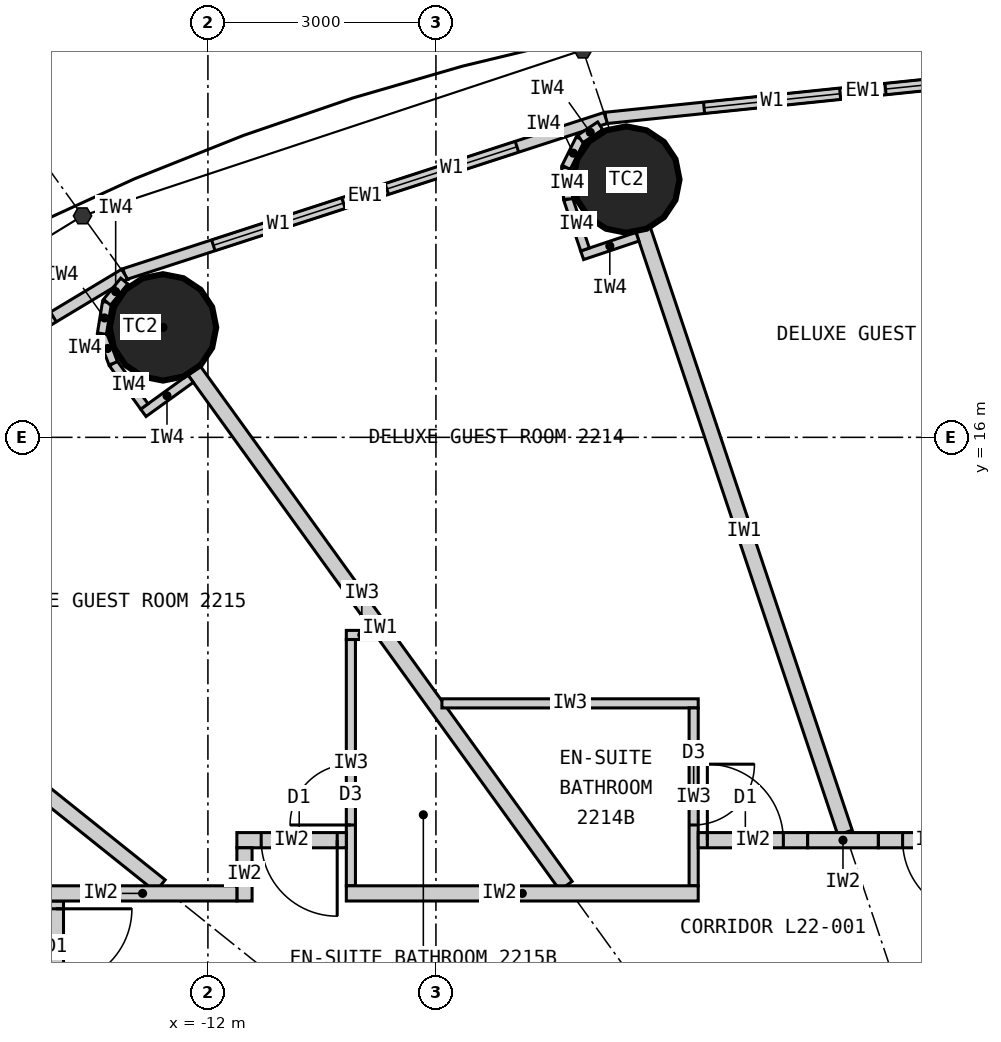
"""IFC4 building model, lengths in metres.
Left out: names, types, materials, properties, quantities, classifications, styles, units other than length and angle.
Written with IfcOpenShell. Run it as: python <this file> out.ifc"""

import sys

from ifc_helpers import new_model, si_unit, direction, frame, frame_2d, origin, origin_2d, place, context, subcontext, project, spatial, rectangle, circle, extrude, element, fill, save


model = new_model("IFC4")
c1 = context("Model", 3, precision=1e-05, world=origin(), true_north=direction((0.0, 1.0)))
c2 = subcontext(c1, "Body", "Model", "MODEL_VIEW")
j1 = project(units=[si_unit("LENGTHUNIT", "METRE"), si_unit("PLANEANGLEUNIT", "RADIAN")], contexts=[c1])
p1 = place(None, origin())
s1 = spatial("IfcSite", under=j1, at=p1, CompositionType="ELEMENT")
p2 = place(p1, origin())
s2 = spatial("IfcBuilding", under=s1, at=p2, CompositionType="ELEMENT")
p3 = place(p2, frame((0.0, 0.0, 87.0)))
s3 = spatial("IfcBuildingStorey", under=s2, at=p3, CompositionType="ELEMENT", Elevation=87.0)
for number, where, z_axis, x_axis in (
    (1, (-6.495, 19.391, 0.0), (0.0, 0.0, 1.0), (1.0, 0.0, 0.0)),
    (2, (-12.591, 17.447, 0.0), (0.0, 0.0, 1.0), (1.0, 0.0, 0.0)),
):
    element("IfcColumn", number, at=place(p3, frame(where, z_axis=z_axis, x_axis=x_axis)), inside=s3, PredefinedType="COLUMN", context=c2, shape_type="SweptSolid", body=[
        extrude(circle(Radius=0.7, at=origin_2d()), origin(), (0.0, 0.0, 1.0), 3.3),
    ])
p4 = place(p3, frame((0.0, 20.9, 0.0), z_axis=(0.0, 0.0, 1.0), x_axis=(-0.994721394369, -0.102612609291, 0.0)))
e3 = element("IfcWall", 3, at=p4, inside=s3, PredefinedType="ELEMENTEDWALL", context=c2, shape_type="SweptSolid", body=[
    extrude(rectangle(XDim=6.802, YDim=0.15, at=frame_2d((3.401, 0.0))), origin(), (0.0, 0.0, 1.0), 3.12),
])
p5 = place(p4, frame((1.301, 0.0, 0.9)))
e4 = element("IfcOpeningElement", 4, at=p5, cuts=e3, PredefinedType="OPENING", context=c2, shape_type="SweptSolid", body=[
    extrude(rectangle(XDim=1.8, YDim=1.9, at=frame_2d((0.9, 0.95))), frame((0.0, 0.085, 0.0), z_axis=(0.0, -1.0, 0.0), x_axis=(1.0, 0.0, 0.0)), (0.0, 0.0, 1.0), 0.17),
])
p6 = place(p4, frame((3.701, 0.0, 0.9)))
e5 = element("IfcOpeningElement", 5, at=p6, cuts=e3, PredefinedType="OPENING", context=c2, shape_type="SweptSolid", body=[
    extrude(rectangle(XDim=1.8, YDim=1.9, at=frame_2d((0.9, 0.95))), frame((0.0, 0.085, 0.0), z_axis=(0.0, -1.0, 0.0), x_axis=(1.0, 0.0, 0.0)), (0.0, 0.0, 1.0), 0.17),
])
p7 = place(p3, frame((-6.766, 20.202, 0.0), z_axis=(0.0, 0.0, 1.0), x_axis=(-0.951137534625, -0.308767534285, 0.0)))
e6 = element("IfcWall", 6, at=p7, inside=s3, PredefinedType="ELEMENTEDWALL", context=c2, shape_type="SweptSolid", body=[
    extrude(rectangle(XDim=6.655, YDim=0.15, at=frame_2d((3.328, 0.0))), origin(), (0.0, 0.0, 1.0), 3.12),
])
p8 = place(p7, frame((1.228, 0.0, 0.9)))
e7 = element("IfcOpeningElement", 7, at=p8, cuts=e6, PredefinedType="OPENING", context=c2, shape_type="SweptSolid", body=[
    extrude(rectangle(XDim=1.8, YDim=1.9, at=frame_2d((0.9, 0.95))), frame((0.0, 0.085, 0.0), z_axis=(0.0, -1.0, 0.0), x_axis=(1.0, 0.0, 0.0)), (0.0, 0.0, 1.0), 0.17),
])
p9 = place(p7, frame((3.628, 0.0, 0.9)))
e8 = element("IfcOpeningElement", 8, at=p9, cuts=e6, PredefinedType="OPENING", context=c2, shape_type="SweptSolid", body=[
    extrude(rectangle(XDim=1.8, YDim=1.9, at=frame_2d((0.9, 0.95))), frame((0.0, 0.085, 0.0), z_axis=(0.0, -1.0, 0.0), x_axis=(1.0, 0.0, 0.0)), (0.0, 0.0, 1.0), 0.17),
])
p10 = place(p3, frame((-13.096, 18.147, 0.0), z_axis=(0.0, 0.0, 1.0), x_axis=(-0.856983180864, -0.515344377787, 0.0)))
e9 = element("IfcWall", 9, at=p10, inside=s3, PredefinedType="ELEMENTEDWALL", context=c2, shape_type="SweptSolid", body=[
    extrude(rectangle(XDim=6.386, YDim=0.15, at=frame_2d((3.193, 0.0))), origin(), (0.0, 0.0, 1.0), 3.12),
])
p11 = place(p10, frame((1.093, 0.0, 0.9)))
e10 = element("IfcOpeningElement", 10, at=p11, cuts=e9, PredefinedType="OPENING", context=c2, shape_type="SweptSolid", body=[
    extrude(rectangle(XDim=1.8, YDim=1.9, at=frame_2d((0.9, 0.95))), frame((0.0, 0.085, 0.0), z_axis=(0.0, -1.0, 0.0), x_axis=(1.0, 0.0, 0.0)), (0.0, 0.0, 1.0), 0.17),
])
p12 = place(p10, frame((3.493, 0.0, 0.9)))
e11 = element("IfcOpeningElement", 11, at=p12, cuts=e9, PredefinedType="OPENING", context=c2, shape_type="SweptSolid", body=[
    extrude(rectangle(XDim=1.8, YDim=1.9, at=frame_2d((0.9, 0.95))), frame((0.0, 0.085, 0.0), z_axis=(0.0, -1.0, 0.0), x_axis=(1.0, 0.0, 0.0)), (0.0, 0.0, 1.0), 0.17),
])
p13 = place(p3, frame((-3.617, 10.8, 0.0), z_axis=(0.0, 0.0, 1.0), x_axis=(-0.317576599239, 0.948232621046, 0.0)))
e12 = element("IfcWall", 12, at=p13, inside=s3, PredefinedType="PARTITIONING", context=c2, shape_type="SweptSolid", body=[
    extrude(rectangle(XDim=8.36, YDim=0.2, at=frame_2d((4.18, 0.0))), origin(), (0.0, 0.0, 1.0), 2.27),
])
p14 = place(p3, frame((-7.289, 10.1, 0.0), z_axis=(0.0, 0.0, 1.0), x_axis=(-0.585198353053, 0.810890182197, 0.0)))
e13 = element("IfcWall", 13, at=p14, inside=s3, PredefinedType="PARTITIONING", context=c2, shape_type="SweptSolid", body=[
    extrude(rectangle(XDim=8.36, YDim=0.2, at=frame_2d((4.18, 0.0))), origin(), (0.0, 0.0, 1.0), 2.27),
])
p15 = place(p3, frame((-12.625, 10.1, 0.0), z_axis=(0.0, 0.0, 1.0), x_axis=(-0.780892451574, 0.624665493744, 0.0)))
e14 = element("IfcWall", 14, at=p15, inside=s3, PredefinedType="PARTITIONING", context=c2, shape_type="SweptSolid", body=[
    extrude(rectangle(XDim=6.045, YDim=0.2, at=frame_2d((3.022, 0.0))), origin(), (0.0, 0.0, 1.0), 2.27),
])
p16 = place(p3, frame((-8.921, 12.5, 0.0), z_axis=(0.0, 0.0, 1.0), x_axis=(1.0, 0.0, 0.0)))
e15 = element("IfcWall", 15, at=p16, inside=s3, PredefinedType="PARTITIONING", context=c2, shape_type="SweptSolid", body=[
    extrude(rectangle(XDim=3.372, YDim=0.12, at=frame_2d((1.686, 0.0))), origin(), (0.0, 0.0, 1.0), 3.12),
])
p17 = place(p3, frame((-5.609, 10.1, 0.0), z_axis=(0.0, 0.0, 1.0), x_axis=(0.0, 1.0, 0.0)))
e16 = element("IfcWall", 16, at=p17, inside=s3, PredefinedType="PARTITIONING", context=c2, shape_type="SweptSolid", body=[
    extrude(rectangle(XDim=2.34, YDim=0.12, at=frame_2d((1.17, 0.0))), origin(), (0.0, 0.0, 1.0), 3.12),
])
p18 = place(p17, frame((0.8, 0.0, 0.0)))
e17 = element("IfcOpeningElement", 17, at=p18, cuts=e16, PredefinedType="OPENING", context=c2, shape_type="SweptSolid", body=[
    extrude(rectangle(XDim=0.8, YDim=2.1, at=frame_2d((0.4, 1.05))), frame((0.0, 0.07, 0.0), z_axis=(0.0, -1.0, 0.0), x_axis=(1.0, 0.0, 0.0)), (0.0, 0.0, 1.0), 0.14),
])
p19 = place(p3, frame((-9.771, 13.4, 0.0), z_axis=(0.0, 0.0, 1.0), x_axis=(-1.0, 0.0, 0.0)))
e18 = element("IfcWall", 18, at=p19, inside=s3, PredefinedType="PARTITIONING", context=c2, shape_type="SweptSolid", body=[
    extrude(rectangle(XDim=0.408, YDim=0.12, at=frame_2d((0.204, 0.0))), origin(), (0.0, 0.0, 1.0), 3.12),
])
p20 = place(p3, frame((-10.119, 10.1, 0.0), z_axis=(0.0, 0.0, 1.0), x_axis=(0.0, 1.0, 0.0)))
e19 = element("IfcWall", 19, at=p20, inside=s3, PredefinedType="PARTITIONING", context=c2, shape_type="SweptSolid", body=[
    extrude(rectangle(XDim=3.24, YDim=0.12, at=frame_2d((1.62, 0.0))), origin(), (0.0, 0.0, 1.0), 3.12),
])
p21 = place(p20, frame((0.8, 0.0, 0.0)))
e20 = element("IfcOpeningElement", 20, at=p21, cuts=e19, PredefinedType="OPENING", context=c2, shape_type="SweptSolid", body=[
    extrude(rectangle(XDim=0.8, YDim=2.1, at=frame_2d((0.4, 1.05))), frame((0.0, 0.07, 0.0), z_axis=(0.0, -1.0, 0.0), x_axis=(1.0, 0.0, 0.0)), (0.0, 0.0, 1.0), 0.14),
])
p22 = place(p3, frame((-3.18, 10.7, 0.0), z_axis=(0.0, 0.0, 1.0), x_axis=(1.0, 0.0, 0.0)))
e21 = element("IfcWall", 21, at=p22, inside=s3, PredefinedType="PARTITIONING", context=c2, shape_type="SweptSolid", body=[
    extrude(rectangle(XDim=1.44, YDim=0.2, at=frame_2d((0.72, 0.0))), origin(), (0.0, 0.0, 1.0), 3.12),
])
p23 = place(p22, frame((0.32, 0.0, 0.0)))
e22 = element("IfcOpeningElement", 22, at=p23, cuts=e21, PredefinedType="OPENING", context=c2, shape_type="SweptSolid", body=[
    extrude(rectangle(XDim=1.0, YDim=2.2, at=frame_2d((0.5, 1.1))), frame((0.0, 0.11, 0.0), z_axis=(0.0, -1.0, 0.0), x_axis=(1.0, 0.0, 0.0)), (0.0, 0.0, 1.0), 0.22),
])
p24 = place(p3, frame((-5.549, 10.7, 0.0), z_axis=(0.0, 0.0, 1.0), x_axis=(1.0, 0.0, 0.0)))
e23 = element("IfcWall", 23, at=p24, inside=s3, PredefinedType="PARTITIONING", context=c2, shape_type="SweptSolid", body=[
    extrude(rectangle(XDim=1.44, YDim=0.2, at=frame_2d((0.72, 0.0))), origin(), (0.0, 0.0, 1.0), 3.12),
])
p25 = place(p24, frame((0.12, 0.0, 0.0)))
e24 = element("IfcOpeningElement", 24, at=p25, cuts=e23, PredefinedType="OPENING", context=c2, shape_type="SweptSolid", body=[
    extrude(rectangle(XDim=1.0, YDim=2.2, at=frame_2d((0.5, 1.1))), frame((0.0, 0.11, 0.0), z_axis=(0.0, -1.0, 0.0), x_axis=(1.0, 0.0, 0.0)), (0.0, 0.0, 1.0), 0.22),
])
p26 = place(p3, frame((-11.619, 10.7, 0.0), z_axis=(0.0, 0.0, 1.0), x_axis=(1.0, 0.0, 0.0)))
e25 = element("IfcWall", 25, at=p26, inside=s3, PredefinedType="PARTITIONING", context=c2, shape_type="SweptSolid", body=[
    extrude(rectangle(XDim=1.44, YDim=0.2, at=frame_2d((0.72, 0.0))), origin(), (0.0, 0.0, 1.0), 3.12),
])
p27 = place(p26, frame((0.32, 0.0, 0.0)))
e26 = element("IfcOpeningElement", 26, at=p27, cuts=e25, PredefinedType="OPENING", context=c2, shape_type="SweptSolid", body=[
    extrude(rectangle(XDim=1.0, YDim=2.2, at=frame_2d((0.5, 1.1))), frame((0.0, 0.11, 0.0), z_axis=(0.0, -1.0, 0.0), x_axis=(1.0, 0.0, 0.0)), (0.0, 0.0, 1.0), 0.22),
])
p28 = place(p3, frame((-11.519, 9.9, 0.0), z_axis=(0.0, 0.0, 1.0), x_axis=(0.0, 1.0, 0.0)))
e27 = element("IfcWall", 27, at=p28, inside=s3, PredefinedType="PARTITIONING", context=c2, shape_type="SweptSolid", body=[
    extrude(rectangle(XDim=0.7, YDim=0.2, at=frame_2d((0.35, 0.0))), origin(), (0.0, 0.0, 1.0), 3.12),
])
p29 = place(p3, frame((-4.109, 10.7, 0.0), z_axis=(0.0, 0.0, 1.0), x_axis=(1.0, 0.0, 0.0)))
e28 = element("IfcWall", 28, at=p29, inside=s3, PredefinedType="PARTITIONING", context=c2, shape_type="SweptSolid", body=[
    extrude(rectangle(XDim=0.929, YDim=0.2, at=frame_2d((0.465, 0.0))), origin(), (0.0, 0.0, 1.0), 3.12),
])
p30 = place(p3, frame((-14.0, 9.9, 0.0), z_axis=(0.0, 0.0, 1.0), x_axis=(0.0, -1.0, 0.0)))
e29 = element("IfcWall", 29, at=p30, inside=s3, PredefinedType="PARTITIONING", context=c2, shape_type="SweptSolid", body=[
    extrude(rectangle(XDim=5.127, YDim=0.2, at=frame_2d((2.564, 0.0))), origin(), (0.0, 0.0, 1.0), 3.12),
])
p31 = place(p30, frame((0.103, 0.0, 0.0)))
e30 = element("IfcOpeningElement", 30, at=p31, cuts=e29, PredefinedType="OPENING", context=c2, shape_type="SweptSolid", body=[
    extrude(rectangle(XDim=1.0, YDim=2.2, at=frame_2d((0.5, 1.1))), frame((0.0, 0.11, 0.0), z_axis=(0.0, -1.0, 0.0), x_axis=(1.0, 0.0, 0.0)), (0.0, 0.0, 1.0), 0.22),
])
p32 = place(p3, frame((-14.1, 10.0, 0.0), z_axis=(0.0, 0.0, 1.0), x_axis=(1.0, 0.0, 0.0)))
e31 = element("IfcWall", 31, at=p32, inside=s3, PredefinedType="PARTITIONING", context=c2, shape_type="SweptSolid", body=[
    extrude(rectangle(XDim=2.481, YDim=0.2, at=frame_2d((1.24, 0.0))), origin(), (0.0, 0.0, 1.0), 3.12),
])
p33 = place(p3, frame((-10.179, 10.0, 0.0), z_axis=(0.0, 0.0, 1.0), x_axis=(1.0, 0.0, 0.0)))
e32 = element("IfcWall", 32, at=p33, inside=s3, PredefinedType="PARTITIONING", context=c2, shape_type="SweptSolid", body=[
    extrude(rectangle(XDim=4.63, YDim=0.2, at=frame_2d((2.315, 0.0))), origin(), (0.0, 0.0, 1.0), 3.12),
])
p34 = place(p3, frame((-6.348, 18.639, 0.0), z_axis=(0.0, 0.0, 1.0), x_axis=(-0.948268951266, -0.317468102437, 0.0)))
e33 = element("IfcWall", 33, at=p34, inside=s3, PredefinedType="PARTITIONING", context=c2, shape_type="SweptSolid", body=[
    extrude(rectangle(XDim=0.768, YDim=0.12, at=frame_2d((0.384, 0.0))), origin(), (0.0, 0.0, 1.0), 3.12),
])
p35 = place(p3, frame((-7.038, 18.471, 0.0), z_axis=(0.0, 0.0, 1.0), x_axis=(-0.317378466199, 0.9482989556, 0.0)))
e34 = element("IfcWall", 34, at=p35, inside=s3, PredefinedType="PARTITIONING", context=c2, shape_type="SweptSolid", body=[
    extrude(rectangle(XDim=0.7, YDim=0.12, at=frame_2d((0.35, 0.0))), origin(), (0.0, 0.0, 1.0), 3.12),
])
p36 = place(p3, frame((-7.26, 19.135, 0.0), z_axis=(0.0, 0.0, 1.0), x_axis=(-0.0613238046, 0.99811792439, 0.0)))
e35 = element("IfcWall", 35, at=p36, inside=s3, PredefinedType="PARTITIONING", context=c2, shape_type="SweptSolid", body=[
    extrude(rectangle(XDim=0.418, YDim=0.12, at=frame_2d((0.209, 0.0))), origin(), (0.0, 0.0, 1.0), 3.12),
])
p37 = place(p3, frame((-7.286, 19.552, 0.0), z_axis=(0.0, 0.0, 1.0), x_axis=(0.445810757773, 0.89512723579, 0.0)))
e36 = element("IfcWall", 36, at=p37, inside=s3, PredefinedType="PARTITIONING", context=c2, shape_type="SweptSolid", body=[
    extrude(rectangle(XDim=0.418, YDim=0.12, at=frame_2d((0.209, 0.0))), origin(), (0.0, 0.0, 1.0), 3.12),
])
p38 = place(p3, frame((-7.1, 19.926, 0.0), z_axis=(0.0, 0.0, 1.0), x_axis=(0.833488262509, 0.552537162787, 0.0)))
e37 = element("IfcWall", 37, at=p38, inside=s3, PredefinedType="PARTITIONING", context=c2, shape_type="SweptSolid", body=[
    extrude(rectangle(XDim=0.313, YDim=0.12, at=frame_2d((0.156, 0.0))), origin(), (0.0, 0.0, 1.0), 3.12),
])
p39 = place(p3, frame((-12.227, 16.772, 0.0), z_axis=(0.0, 0.0, 1.0), x_axis=(-0.810821798253, -0.585293098778, 0.0)))
e38 = element("IfcWall", 38, at=p39, inside=s3, PredefinedType="PARTITIONING", context=c2, shape_type="SweptSolid", body=[
    extrude(rectangle(XDim=0.768, YDim=0.12, at=frame_2d((0.384, 0.0))), origin(), (0.0, 0.0, 1.0), 3.12),
])
p40 = place(p3, frame((-12.836, 16.406, 0.0), z_axis=(0.0, 0.0, 1.0), x_axis=(-0.585223113993, 0.810872312296, 0.0)))
e39 = element("IfcWall", 39, at=p40, inside=s3, PredefinedType="PARTITIONING", context=c2, shape_type="SweptSolid", body=[
    extrude(rectangle(XDim=0.7, YDim=0.12, at=frame_2d((0.35, 0.0))), origin(), (0.0, 0.0, 1.0), 3.12),
])
p41 = place(p3, frame((-13.246, 16.974, 0.0), z_axis=(0.0, 0.0, 1.0), x_axis=(-0.355728122235, 0.934589483705, 0.0)))
e40 = element("IfcWall", 40, at=p41, inside=s3, PredefinedType="PARTITIONING", context=c2, shape_type="SweptSolid", body=[
    extrude(rectangle(XDim=0.418, YDim=0.12, at=frame_2d((0.209, 0.0))), origin(), (0.0, 0.0, 1.0), 3.12),
])
p42 = place(p3, frame((-13.394, 17.365, 0.0), z_axis=(0.0, 0.0, 1.0), x_axis=(0.159379276926, 0.987217425943, 0.0)))
e41 = element("IfcWall", 41, at=p42, inside=s3, PredefinedType="PARTITIONING", context=c2, shape_type="SweptSolid", body=[
    extrude(rectangle(XDim=0.418, YDim=0.12, at=frame_2d((0.209, 0.0))), origin(), (0.0, 0.0, 1.0), 3.12),
])
p43 = place(p3, frame((-13.328, 17.777, 0.0), z_axis=(0.0, 0.0, 1.0), x_axis=(0.632276783541, 0.774742582407, 0.0)))
e42 = element("IfcWall", 42, at=p43, inside=s3, PredefinedType="PARTITIONING", context=c2, shape_type="SweptSolid", body=[
    extrude(rectangle(XDim=0.36, YDim=0.12, at=frame_2d((0.18, 0.0))), origin(), (0.0, 0.0, 1.0), 3.12),
])
p44 = place(p5, origin())
e43 = element("IfcWindow", 43, at=p44, inside=s3, PartitioningType="SINGLE_PANEL", PredefinedType="WINDOW", context=c2, shape_type="SweptSolid", body=[
    extrude(rectangle(XDim=1.8, YDim=1.9, at=frame_2d((0.9, 0.95))), frame((0.0, 0.03, 0.0), z_axis=(0.0, -1.0, 0.0), x_axis=(1.0, 0.0, 0.0)), (0.0, 0.0, 1.0), 0.06),
])
fill(e4, e43)
p45 = place(p6, origin())
e44 = element("IfcWindow", 44, at=p45, inside=s3, PartitioningType="SINGLE_PANEL", PredefinedType="WINDOW", context=c2, shape_type="SweptSolid", body=[
    extrude(rectangle(XDim=1.8, YDim=1.9, at=frame_2d((0.9, 0.95))), frame((0.0, 0.03, 0.0), z_axis=(0.0, -1.0, 0.0), x_axis=(1.0, 0.0, 0.0)), (0.0, 0.0, 1.0), 0.06),
])
fill(e5, e44)
p46 = place(p8, origin())
e45 = element("IfcWindow", 45, at=p46, inside=s3, PartitioningType="SINGLE_PANEL", PredefinedType="WINDOW", context=c2, shape_type="SweptSolid", body=[
    extrude(rectangle(XDim=1.8, YDim=1.9, at=frame_2d((0.9, 0.95))), frame((0.0, 0.03, 0.0), z_axis=(0.0, -1.0, 0.0), x_axis=(1.0, 0.0, 0.0)), (0.0, 0.0, 1.0), 0.06),
])
fill(e7, e45)
p47 = place(p9, origin())
e46 = element("IfcWindow", 46, at=p47, inside=s3, PartitioningType="SINGLE_PANEL", PredefinedType="WINDOW", context=c2, shape_type="SweptSolid", body=[
    extrude(rectangle(XDim=1.8, YDim=1.9, at=frame_2d((0.9, 0.95))), frame((0.0, 0.03, 0.0), z_axis=(0.0, -1.0, 0.0), x_axis=(1.0, 0.0, 0.0)), (0.0, 0.0, 1.0), 0.06),
])
fill(e8, e46)
p48 = place(p11, origin())
e47 = element("IfcWindow", 47, at=p48, inside=s3, PartitioningType="SINGLE_PANEL", PredefinedType="WINDOW", context=c2, shape_type="SweptSolid", body=[
    extrude(rectangle(XDim=1.8, YDim=1.9, at=frame_2d((0.9, 0.95))), frame((0.0, 0.03, 0.0), z_axis=(0.0, -1.0, 0.0), x_axis=(1.0, 0.0, 0.0)), (0.0, 0.0, 1.0), 0.06),
])
fill(e10, e47)
p49 = place(p23, origin())
e48 = element("IfcDoor", 48, at=p49, inside=s3, OperationType="SINGLE_SWING_RIGHT", PredefinedType="DOOR", context=c2, shape_type="SweptSolid", body=[
    extrude(rectangle(XDim=1.0, YDim=2.2, at=frame_2d((0.5, 1.1))), frame((0.0, 0.025, 0.0), z_axis=(0.0, -1.0, 0.0), x_axis=(1.0, 0.0, 0.0)), (0.0, 0.0, 1.0), 0.05),
])
fill(e22, e48)
p50 = place(p18, origin())
e49 = element("IfcDoor", 49, at=p50, inside=s3, OperationType="SINGLE_SWING_RIGHT", PredefinedType="DOOR", context=c2, shape_type="SweptSolid", body=[
    extrude(rectangle(XDim=0.8, YDim=2.1, at=frame_2d((0.4, 1.05))), frame((0.0, 0.025, 0.0), z_axis=(0.0, -1.0, 0.0), x_axis=(1.0, 0.0, 0.0)), (0.0, 0.0, 1.0), 0.05),
])
fill(e17, e49)
p51 = place(p25, origin())
e50 = element("IfcDoor", 50, at=p51, inside=s3, OperationType="SINGLE_SWING_LEFT", PredefinedType="DOOR", context=c2, shape_type="SweptSolid", body=[
    extrude(rectangle(XDim=1.0, YDim=2.2, at=frame_2d((0.5, 1.1))), frame((0.0, 0.025, 0.0), z_axis=(0.0, -1.0, 0.0), x_axis=(1.0, 0.0, 0.0)), (0.0, 0.0, 1.0), 0.05),
])
fill(e24, e50)
p52 = place(p21, origin())
e51 = element("IfcDoor", 51, at=p52, inside=s3, OperationType="SINGLE_SWING_LEFT", PredefinedType="DOOR", context=c2, shape_type="SweptSolid", body=[
    extrude(rectangle(XDim=0.8, YDim=2.1, at=frame_2d((0.4, 1.05))), frame((0.0, 0.025, 0.0), z_axis=(0.0, -1.0, 0.0), x_axis=(1.0, 0.0, 0.0)), (0.0, 0.0, 1.0), 0.05),
])
fill(e20, e51)
p53 = place(p27, origin())
e52 = element("IfcDoor", 52, at=p53, inside=s3, OperationType="SINGLE_SWING_RIGHT", PredefinedType="DOOR", context=c2, shape_type="SweptSolid", body=[
    extrude(rectangle(XDim=1.0, YDim=2.2, at=frame_2d((0.5, 1.1))), frame((0.0, 0.025, 0.0), z_axis=(0.0, -1.0, 0.0), x_axis=(1.0, 0.0, 0.0)), (0.0, 0.0, 1.0), 0.05),
])
fill(e26, e52)
p54 = place(p31, origin())
e53 = element("IfcDoor", 53, at=p54, inside=s3, OperationType="SINGLE_SWING_LEFT", PredefinedType="DOOR", context=c2, shape_type="SweptSolid", body=[
    extrude(rectangle(XDim=1.0, YDim=2.2, at=frame_2d((0.5, 1.1))), frame((0.0, 0.025, 0.0), z_axis=(0.0, -1.0, 0.0), x_axis=(1.0, 0.0, 0.0)), (0.0, 0.0, 1.0), 0.05),
])
fill(e30, e53)
save(model, sys.argv[1])
